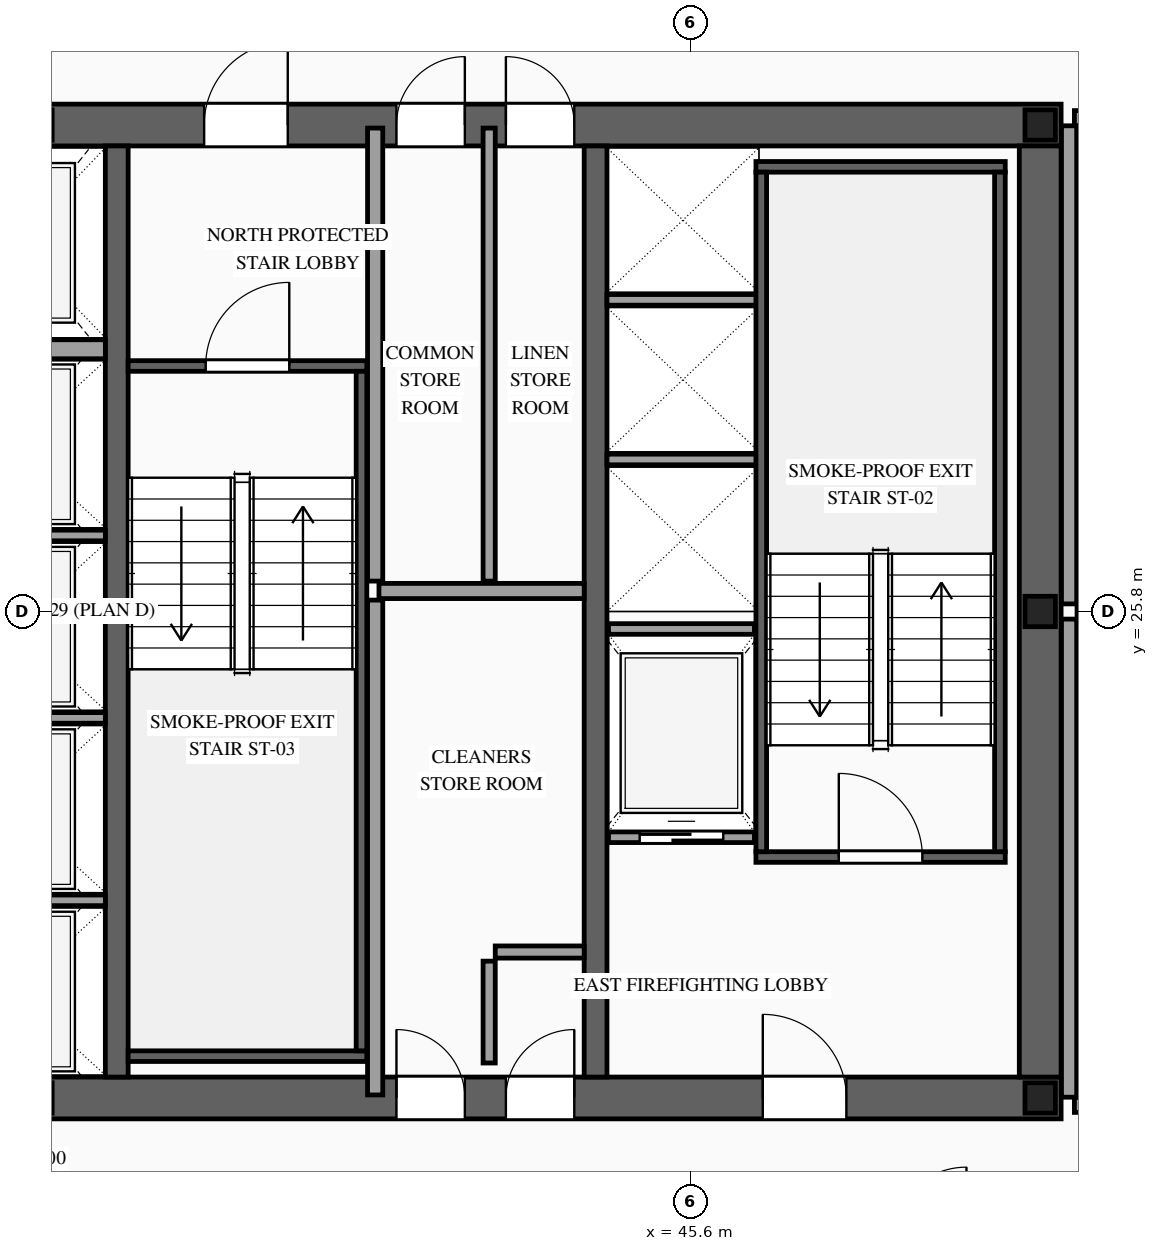
"""IFC4 building model, lengths in metres.
Left out: names, types, materials, properties, quantities, classifications, styles, units other than length and angle.
Written with IfcOpenShell. Run it as: python <this file> out.ifc"""

import sys

from ifc_helpers import new_model, si_unit, direction, frame, frame_2d, origin, origin_2d, place, context, subcontext, project, spatial, rectangle, i_section, extrude, source, transform, mapped, element, fill, save


model = new_model("IFC4")
c1 = context("Model", 3, precision=1e-05, world=origin(), true_north=direction((0.0, 1.0)))
c2 = subcontext(c1, "Body", "Model", "MODEL_VIEW")
j1 = project(units=[si_unit("LENGTHUNIT", "METRE"), si_unit("PLANEANGLEUNIT", "RADIAN")], contexts=[c1])
p1 = place(None, origin())
s1 = spatial("IfcSite", under=j1, at=p1, CompositionType="ELEMENT")
p2 = place(p1, origin())
s2 = spatial("IfcBuilding", under=s1, at=p2, CompositionType="ELEMENT")
p3 = place(p2, frame((0.0, 0.0, 238.1)))
s3 = spatial("IfcBuildingStorey", under=s2, at=p3, CompositionType="ELEMENT", Elevation=238.1)
p4 = place(p3, frame((23.525, 19.4, 0.0), z_axis=(0.0, 0.0, 1.0), x_axis=(1.0, 0.0, 0.0)))
e1 = element("IfcWall", 1, at=p4, inside=s3, PredefinedType="SHEAR", context=c2, shape_type="SweptSolid", body=[
    extrude(rectangle(XDim=26.95, YDim=0.55, at=frame_2d((13.475, 0.0))), origin(), (0.0, 0.0, 1.0), 3.5),
])
p5 = place(p4, frame((1.925, 0.0, 0.0)))
e2 = element("IfcOpeningElement", 2, at=p5, cuts=e1, PredefinedType="OPENING", context=c2, shape_type="SweptSolid", body=[
    extrude(rectangle(XDim=1.1, YDim=2.2, at=frame_2d((0.55, 1.1))), frame((0.0, 0.29, 0.0), z_axis=(0.0, -1.0, 0.0), x_axis=(1.0, 0.0, 0.0)), (0.0, 0.0, 1.0), 0.58),
])
p6 = place(p4, frame((9.825, 0.0, 0.0)))
e3 = element("IfcOpeningElement", 3, at=p6, cuts=e1, PredefinedType="OPENING", context=c2, shape_type="SweptSolid", body=[
    extrude(rectangle(XDim=1.1, YDim=2.2, at=frame_2d((0.55, 1.1))), frame((0.0, 0.29, 0.0), z_axis=(0.0, -1.0, 0.0), x_axis=(1.0, 0.0, 0.0)), (0.0, 0.0, 1.0), 0.58),
])
p7 = place(p4, frame((23.025, 0.0, 0.0)))
e4 = element("IfcOpeningElement", 4, at=p7, cuts=e1, PredefinedType="OPENING", context=c2, shape_type="SweptSolid", body=[
    extrude(rectangle(XDim=1.1, YDim=2.2, at=frame_2d((0.55, 1.1))), frame((0.0, 0.29, 0.0), z_axis=(0.0, -1.0, 0.0), x_axis=(1.0, 0.0, 0.0)), (0.0, 0.0, 1.0), 0.58),
])
p8 = place(p4, frame((19.645, 0.0, 0.0)))
e5 = element("IfcOpeningElement", 5, at=p8, cuts=e1, PredefinedType="OPENING", context=c2, shape_type="SweptSolid", body=[
    extrude(rectangle(XDim=0.9, YDim=2.15, at=frame_2d((0.45, 1.075))), frame((0.0, 0.29, 0.0), z_axis=(0.0, -1.0, 0.0), x_axis=(1.0, 0.0, 0.0)), (0.0, 0.0, 1.0), 0.58),
])
p9 = place(p4, frame((18.205, 0.0, 0.0)))
e6 = element("IfcOpeningElement", 6, at=p9, cuts=e1, PredefinedType="OPENING", context=c2, shape_type="SweptSolid", body=[
    extrude(rectangle(XDim=0.9, YDim=2.15, at=frame_2d((0.45, 1.075))), frame((0.0, 0.29, 0.0), z_axis=(0.0, -1.0, 0.0), x_axis=(1.0, 0.0, 0.0)), (0.0, 0.0, 1.0), 0.58),
])
p10 = place(p3, frame((23.525, 32.2, 0.0), z_axis=(0.0, 0.0, 1.0), x_axis=(1.0, 0.0, 0.0)))
e7 = element("IfcWall", 7, at=p10, inside=s3, PredefinedType="SHEAR", context=c2, shape_type="SweptSolid", body=[
    extrude(rectangle(XDim=26.95, YDim=0.55, at=frame_2d((13.475, 0.0))), origin(), (0.0, 0.0, 1.0), 3.5),
])
p11 = place(p10, frame((4.545, 0.0, 0.0)))
e8 = element("IfcOpeningElement", 8, at=p11, cuts=e7, PredefinedType="OPENING", context=c2, shape_type="SweptSolid", body=[
    extrude(rectangle(XDim=0.9, YDim=2.15, at=frame_2d((0.45, 1.075))), frame((0.0, 0.29, 0.0), z_axis=(0.0, -1.0, 0.0), x_axis=(1.0, 0.0, 0.0)), (0.0, 0.0, 1.0), 0.58),
])
p12 = place(p10, frame((9.825, 0.0, 0.0)))
e9 = element("IfcOpeningElement", 9, at=p12, cuts=e7, PredefinedType="OPENING", context=c2, shape_type="SweptSolid", body=[
    extrude(rectangle(XDim=1.1, YDim=2.2, at=frame_2d((0.55, 1.1))), frame((0.0, 0.29, 0.0), z_axis=(0.0, -1.0, 0.0), x_axis=(1.0, 0.0, 0.0)), (0.0, 0.0, 1.0), 0.58),
])
p13 = place(p10, frame((15.675, 0.0, 0.0)))
e10 = element("IfcOpeningElement", 10, at=p13, cuts=e7, PredefinedType="OPENING", context=c2, shape_type="SweptSolid", body=[
    extrude(rectangle(XDim=1.1, YDim=2.2, at=frame_2d((0.55, 1.1))), frame((0.0, 0.29, 0.0), z_axis=(0.0, -1.0, 0.0), x_axis=(1.0, 0.0, 0.0)), (0.0, 0.0, 1.0), 0.58),
])
p14 = place(p10, frame((18.205, 0.0, 0.0)))
e11 = element("IfcOpeningElement", 11, at=p14, cuts=e7, PredefinedType="OPENING", context=c2, shape_type="SweptSolid", body=[
    extrude(rectangle(XDim=0.9, YDim=2.15, at=frame_2d((0.45, 1.075))), frame((0.0, 0.29, 0.0), z_axis=(0.0, -1.0, 0.0), x_axis=(1.0, 0.0, 0.0)), (0.0, 0.0, 1.0), 0.58),
])
p15 = place(p10, frame((19.645, 0.0, 0.0)))
e12 = element("IfcOpeningElement", 12, at=p15, cuts=e7, PredefinedType="OPENING", context=c2, shape_type="SweptSolid", body=[
    extrude(rectangle(XDim=0.9, YDim=2.15, at=frame_2d((0.45, 1.075))), frame((0.0, 0.29, 0.0), z_axis=(0.0, -1.0, 0.0), x_axis=(1.0, 0.0, 0.0)), (0.0, 0.0, 1.0), 0.58),
])
m1 = source(origin(), c2, "Body", "SweptSolid", [
    extrude(rectangle(XDim=12.25, YDim=0.55, at=frame_2d((6.125, 0.0))), origin(), (0.0, 0.0, 1.0), 3.5),
])
p16 = place(p3, frame((50.2, 19.675, 0.0), z_axis=(0.0, 0.0, 1.0), x_axis=(0.0, 1.0, 0.0)))
e13 = element("IfcWall", 13, at=p16, inside=s3, PredefinedType="SHEAR", context=c2, shape_type="MappedRepresentation", body=[
    mapped(m1, transform((0.0, 0.0, 0.0), scale=1.0)),
])
m2 = source(origin(), c2, "Body", "SweptSolid", [
    extrude(rectangle(XDim=12.25, YDim=0.3, at=frame_2d((6.125, 0.0))), origin(), (0.0, 0.0, 1.0), 3.5),
])
for number, where, z_axis, x_axis in (
    (14, (38.05, 19.675, 0.0), (0.0, 0.0, 1.0), (0.0, 1.0, 0.0)),
    (15, (44.35, 19.675, 0.0), (0.0, 0.0, 1.0), (0.0, 1.0, 0.0)),
):
    element("IfcWall", number, at=place(p3, frame(where, z_axis=z_axis, x_axis=x_axis)), inside=s3, PredefinedType="SOLIDWALL", context=c2, shape_type="MappedRepresentation", body=[
        mapped(m2, transform((0.0, 0.0, 0.0), scale=1.0)),
    ])
m3 = source(origin(), c2, "Body", "SweptSolid", [
    extrude(i_section(OverallWidth=0.4, OverallDepth=0.4, WebThickness=0.013, FlangeThickness=0.021, at=origin_2d()), origin(), (0.0, 0.0, 1.0), 3.5),
])
for number, where, z_axis, x_axis in (
    (16, (50.2, 19.4, 0.0), (0.0, 0.0, 1.0), (1.0, 0.0, 0.0)),
    (17, (50.2, 25.8, 0.0), (0.0, 0.0, 1.0), (1.0, 0.0, 0.0)),
    (18, (50.2, 32.2, 0.0), (0.0, 0.0, 1.0), (1.0, 0.0, 0.0)),
):
    element("IfcColumn", number, at=place(p3, frame(where, z_axis=z_axis, x_axis=x_axis)), inside=s3, PredefinedType="COLUMN", context=c2, shape_type="MappedRepresentation", body=[
        mapped(m3, transform((0.0, 0.0, 0.0), scale=1.0)),
    ])
p17 = place(p3, frame((44.52, 22.83, 0.0), z_axis=(0.0, 0.0, 1.0), x_axis=(1.0, 0.0, 0.0)))
e19 = element("IfcWall", 19, at=p17, inside=s3, PredefinedType="SOLIDWALL", context=c2, shape_type="SweptSolid", body=[
    extrude(rectangle(XDim=1.92, YDim=0.14, at=frame_2d((0.96, 0.0))), origin(), (0.0, 0.0, 1.0), 3.28),
])
p18 = place(p17, frame((0.41, 0.0, 0.0)))
e20 = element("IfcOpeningElement", 20, at=p18, cuts=e19, PredefinedType="OPENING", context=c2, shape_type="SweptSolid", body=[
    extrude(rectangle(XDim=1.1, YDim=2.2, at=frame_2d((0.55, 1.1))), frame((0.0, 0.085, 0.0), z_axis=(0.0, -1.0, 0.0), x_axis=(1.0, 0.0, 0.0)), (0.0, 0.0, 1.0), 0.17),
])
m4 = source(origin(), c2, "Body", "SweptSolid", [
    extrude(rectangle(XDim=1.92, YDim=0.14, at=frame_2d((0.96, 0.0))), origin(), (0.0, 0.0, 1.0), 3.28),
])
p19 = place(p3, frame((44.52, 25.57, 0.0), z_axis=(0.0, 0.0, 1.0), x_axis=(1.0, 0.0, 0.0)))
e21 = element("IfcWall", 21, at=p19, inside=s3, PredefinedType="SOLIDWALL", context=c2, shape_type="MappedRepresentation", body=[
    mapped(m4, transform((0.0, 0.0, 0.0), scale=1.0)),
])
m5 = source(origin(), c2, "Body", "SweptSolid", [
    extrude(rectangle(XDim=2.4, YDim=0.14, at=frame_2d((1.2, 0.0))), origin(), (0.0, 0.0, 1.0), 3.28),
])
for number, where, z_axis, x_axis in (
    (22, (35.5, 22.0, 0.0), (0.0, 0.0, 1.0), (1.0, 0.0, 0.0)),
    (23, (35.5, 24.4, 0.0), (0.0, 0.0, 1.0), (1.0, 0.0, 0.0)),
    (24, (35.5, 26.8, 0.0), (0.0, 0.0, 1.0), (1.0, 0.0, 0.0)),
):
    element("IfcWall", number, at=place(p3, frame(where, z_axis=z_axis, x_axis=x_axis)), inside=s3, PredefinedType="SOLIDWALL", context=c2, shape_type="MappedRepresentation", body=[
        mapped(m5, transform((0.0, 0.0, 0.0), scale=1.0)),
    ])
m6 = source(origin(), c2, "Body", "SweptSolid", [
    extrude(rectangle(XDim=2.4, YDim=0.25, at=frame_2d((1.2, 0.0))), origin(), (0.0, 0.0, 1.0), 3.28),
])
p20 = place(p3, frame((35.5, 29.25, 0.0), z_axis=(0.0, 0.0, 1.0), x_axis=(1.0, 0.0, 0.0)))
e25 = element("IfcWall", 25, at=p20, inside=s3, PredefinedType="SOLIDWALL", context=c2, shape_type="MappedRepresentation", body=[
    mapped(m6, transform((0.0, 0.0, 0.0), scale=1.0)),
])
m7 = source(origin(), c2, "Body", "SweptSolid", [
    extrude(rectangle(XDim=2.0, YDim=0.14, at=frame_2d((1.0, 0.0))), origin(), (0.0, 0.0, 1.0), 3.28),
])
for number, where, z_axis, x_axis in (
    (26, (44.5, 27.8, 0.0), (0.0, 0.0, 1.0), (1.0, 0.0, 0.0)),
    (27, (44.5, 29.9, 0.0), (0.0, 0.0, 1.0), (1.0, 0.0, 0.0)),
):
    element("IfcWall", number, at=place(p3, frame(where, z_axis=z_axis, x_axis=x_axis)), inside=s3, PredefinedType="SOLIDWALL", context=c2, shape_type="MappedRepresentation", body=[
        mapped(m7, transform((0.0, 0.0, 0.0), scale=1.0)),
    ])
p21 = place(p3, frame((46.46, 22.57, 0.0), z_axis=(0.0, 0.0, 1.0), x_axis=(1.0, 0.0, 0.0)))
e28 = element("IfcWall", 28, at=p21, inside=s3, PredefinedType="SOLIDWALL", context=c2, shape_type="SweptSolid", body=[
    extrude(rectangle(XDim=3.28, YDim=0.14, at=frame_2d((1.64, 0.0))), origin(), (0.0, 0.0, 1.0), 3.28),
])
p22 = place(p21, frame((1.09, 0.0, 0.0)))
e29 = element("IfcOpeningElement", 29, at=p22, cuts=e28, PredefinedType="OPENING", context=c2, shape_type="SweptSolid", body=[
    extrude(rectangle(XDim=1.1, YDim=2.2, at=frame_2d((0.55, 1.1))), frame((0.0, 0.085, 0.0), z_axis=(0.0, -1.0, 0.0), x_axis=(1.0, 0.0, 0.0)), (0.0, 0.0, 1.0), 0.17),
])
m8 = source(origin(), c2, "Body", "SweptSolid", [
    extrude(rectangle(XDim=3.28, YDim=0.14, at=frame_2d((1.64, 0.0))), origin(), (0.0, 0.0, 1.0), 3.28),
])
p23 = place(p3, frame((46.46, 31.65, 0.0), z_axis=(0.0, 0.0, 1.0), x_axis=(1.0, 0.0, 0.0)))
e30 = element("IfcWall", 30, at=p23, inside=s3, PredefinedType="SOLIDWALL", context=c2, shape_type="MappedRepresentation", body=[
    mapped(m8, transform((0.0, 0.0, 0.0), scale=1.0)),
])
m9 = source(origin(), c2, "Body", "SweptSolid", [
    extrude(rectangle(XDim=8.94, YDim=0.14, at=frame_2d((4.47, 0.0))), origin(), (0.0, 0.0, 1.0), 3.28),
])
for number, where, z_axis, x_axis in (
    (31, (46.53, 22.64, 0.0), (0.0, 0.0, 1.0), (0.0, 1.0, 0.0)),
    (32, (49.67, 22.64, 0.0), (0.0, 0.0, 1.0), (0.0, 1.0, 0.0)),
):
    element("IfcWall", number, at=place(p3, frame(where, z_axis=z_axis, x_axis=x_axis)), inside=s3, PredefinedType="SOLIDWALL", context=c2, shape_type="MappedRepresentation", body=[
        mapped(m9, transform((0.0, 0.0, 0.0), scale=1.0)),
    ])
p24 = place(p3, frame((38.2, 29.03, 0.0), z_axis=(0.0, 0.0, 1.0), x_axis=(1.0, 0.0, 0.0)))
e33 = element("IfcWall", 33, at=p24, inside=s3, PredefinedType="SOLIDWALL", context=c2, shape_type="SweptSolid", body=[
    extrude(rectangle(XDim=3.14, YDim=0.14, at=frame_2d((1.57, 0.0))), origin(), (0.0, 0.0, 1.0), 3.28),
])
p25 = place(p24, frame((1.02, 0.0, 0.0)))
e34 = element("IfcOpeningElement", 34, at=p25, cuts=e33, PredefinedType="OPENING", context=c2, shape_type="SweptSolid", body=[
    extrude(rectangle(XDim=1.1, YDim=2.2, at=frame_2d((0.55, 1.1))), frame((0.0, 0.085, 0.0), z_axis=(0.0, -1.0, 0.0), x_axis=(1.0, 0.0, 0.0)), (0.0, 0.0, 1.0), 0.17),
])
m10 = source(origin(), c2, "Body", "SweptSolid", [
    extrude(rectangle(XDim=3.14, YDim=0.14, at=frame_2d((1.57, 0.0))), origin(), (0.0, 0.0, 1.0), 3.28),
])
p26 = place(p3, frame((38.2, 19.95, 0.0), z_axis=(0.0, 0.0, 1.0), x_axis=(1.0, 0.0, 0.0)))
e35 = element("IfcWall", 35, at=p26, inside=s3, PredefinedType="SOLIDWALL", context=c2, shape_type="MappedRepresentation", body=[
    mapped(m10, transform((0.0, 0.0, 0.0), scale=1.0)),
])
m11 = source(origin(), c2, "Body", "SweptSolid", [
    extrude(rectangle(XDim=8.94, YDim=0.14, at=frame_2d((4.47, 0.0))), origin(), (0.0, 0.0, 1.0), 3.28),
])
p27 = place(p3, frame((41.27, 20.02, 0.0), z_axis=(0.0, 0.0, 1.0), x_axis=(0.0, 1.0, 0.0)))
e36 = element("IfcWall", 36, at=p27, inside=s3, PredefinedType="SOLIDWALL", context=c2, shape_type="MappedRepresentation", body=[
    mapped(m11, transform((0.0, 0.0, 0.0), scale=1.0)),
])
m12 = source(origin(), c2, "Body", "SweptSolid", [
    extrude(rectangle(XDim=1.34, YDim=0.16, at=frame_2d((0.67, 0.0))), origin(), (0.0, 0.0, 1.0), 3.28),
])
p28 = place(p3, frame((42.95, 19.86, 0.0), z_axis=(0.0, 0.0, 1.0), x_axis=(0.0, 1.0, 0.0)))
e37 = element("IfcWall", 37, at=p28, inside=s3, PredefinedType="PARTITIONING", context=c2, shape_type="MappedRepresentation", body=[
    mapped(m12, transform((0.0, 0.0, 0.0), scale=1.0)),
])
m13 = source(origin(), c2, "Body", "SweptSolid", [
    extrude(rectangle(XDim=1.17, YDim=0.16, at=frame_2d((0.585, 0.0))), origin(), (0.0, 0.0, 1.0), 3.28),
])
p29 = place(p3, frame((43.03, 21.32, 0.0), z_axis=(0.0, 0.0, 1.0), x_axis=(1.0, 0.0, 0.0)))
e38 = element("IfcWall", 38, at=p29, inside=s3, PredefinedType="PARTITIONING", context=c2, shape_type="MappedRepresentation", body=[
    mapped(m13, transform((0.0, 0.0, 0.0), scale=1.0)),
])
m14 = source(origin(), c2, "Body", "SweptSolid", [
    extrude(rectangle(XDim=6.51, YDim=0.2, at=frame_2d((3.255, 0.0))), origin(), (0.0, 0.0, 1.0), 3.28),
])
p30 = place(p3, frame((41.45, 19.44, 0.0), z_axis=(0.0, 0.0, 1.0), x_axis=(0.0, 1.0, 0.0)))
e39 = element("IfcWall", 39, at=p30, inside=s3, PredefinedType="PARTITIONING", context=c2, shape_type="MappedRepresentation", body=[
    mapped(m14, transform((0.0, 0.0, 0.0), scale=1.0)),
])
m15 = source(origin(), c2, "Body", "SweptSolid", [
    extrude(rectangle(XDim=2.7, YDim=0.2, at=frame_2d((1.35, 0.0))), origin(), (0.0, 0.0, 1.0), 3.28),
])
p31 = place(p3, frame((41.5, 26.07, 0.0), z_axis=(0.0, 0.0, 1.0), x_axis=(1.0, 0.0, 0.0)))
e40 = element("IfcWall", 40, at=p31, inside=s3, PredefinedType="PARTITIONING", context=c2, shape_type="MappedRepresentation", body=[
    mapped(m15, transform((0.0, 0.0, 0.0), scale=1.0)),
])
m16 = source(origin(), c2, "Body", "SweptSolid", [
    extrude(rectangle(XDim=5.96, YDim=0.2, at=frame_2d((2.98, 0.0))), origin(), (0.0, 0.0, 1.0), 3.28),
])
p32 = place(p3, frame((41.45, 26.2, 0.0), z_axis=(0.0, 0.0, 1.0), x_axis=(0.0, 1.0, 0.0)))
e41 = element("IfcWall", 41, at=p32, inside=s3, PredefinedType="PARTITIONING", context=c2, shape_type="MappedRepresentation", body=[
    mapped(m16, transform((0.0, 0.0, 0.0), scale=1.0)),
])
m17 = source(origin(), c2, "Body", "SweptSolid", [
    extrude(rectangle(XDim=5.96, YDim=0.16, at=frame_2d((2.98, 0.0))), origin(), (0.0, 0.0, 1.0), 3.28),
])
p33 = place(p3, frame((42.95, 26.2, 0.0), z_axis=(0.0, 0.0, 1.0), x_axis=(0.0, 1.0, 0.0)))
e42 = element("IfcWall", 42, at=p33, inside=s3, PredefinedType="PARTITIONING", context=c2, shape_type="MappedRepresentation", body=[
    mapped(m17, transform((0.0, 0.0, 0.0), scale=1.0)),
])
p34 = place(p3, frame((50.65, 19.31, 0.0), z_axis=(0.0, 0.0, 1.0), x_axis=(1.0, 0.0, 0.0)))
e43 = element("IfcWall", 43, at=p34, inside=s3, PredefinedType="PARTITIONING", context=c2, shape_type="SweptSolid", body=[
    extrude(rectangle(XDim=6.8, YDim=0.2, at=frame_2d((3.4, 0.0))), origin(), (0.0, 0.0, 1.0), 2.825),
])
p35 = place(p34, frame((2.8, 0.0, 0.0)))
e44 = element("IfcOpeningElement", 44, at=p35, cuts=e43, PredefinedType="OPENING", context=c2, shape_type="SweptSolid", body=[
    extrude(rectangle(XDim=1.0, YDim=2.2, at=frame_2d((0.5, 1.1))), frame((0.0, 0.115, 0.0), z_axis=(0.0, -1.0, 0.0), x_axis=(1.0, 0.0, 0.0)), (0.0, 0.0, 1.0), 0.23),
])
m18 = source(origin(), c2, "Body", "SweptSolid", [
    extrude(rectangle(XDim=6.765, YDim=0.2, at=frame_2d((3.382, 0.0))), origin(), (0.0, 0.0, 1.0), 2.787),
])
p36 = place(p3, frame((50.685, 25.8, 0.0), z_axis=(0.0, 0.0, 1.0), x_axis=(1.0, 0.0, 0.0)))
e45 = element("IfcWall", 45, at=p36, inside=s3, PredefinedType="PARTITIONING", context=c2, shape_type="MappedRepresentation", body=[
    mapped(m18, transform((0.0, 0.0, 0.0), scale=1.0)),
])
m19 = source(origin(), c2, "Body", "SweptSolid", [
    extrude(rectangle(XDim=6.29, YDim=0.2, at=frame_2d((3.145, 0.0))), origin(), (0.0, 0.0, 1.0), 3.28),
])
p37 = place(p3, frame((50.58, 19.41, 0.0), z_axis=(0.0, 0.0, 1.0), x_axis=(0.0, 1.0, 0.0)))
e46 = element("IfcWall", 46, at=p37, inside=s3, PredefinedType="PARTITIONING", context=c2, shape_type="MappedRepresentation", body=[
    mapped(m19, transform((0.0, 0.0, 0.0), scale=1.0)),
])
p38 = place(p3, frame((50.65, 32.29, 0.0), z_axis=(0.0, 0.0, 1.0), x_axis=(1.0, 0.0, 0.0)))
e47 = element("IfcWall", 47, at=p38, inside=s3, PredefinedType="PARTITIONING", context=c2, shape_type="SweptSolid", body=[
    extrude(rectangle(XDim=6.8, YDim=0.2, at=frame_2d((3.4, 0.0))), origin(), (0.0, 0.0, 1.0), 2.825),
])
p39 = place(p38, frame((2.835, 0.0, 0.0)))
e48 = element("IfcOpeningElement", 48, at=p39, cuts=e47, PredefinedType="OPENING", context=c2, shape_type="SweptSolid", body=[
    extrude(rectangle(XDim=1.0, YDim=2.2, at=frame_2d((0.5, 1.1))), frame((0.0, 0.115, 0.0), z_axis=(0.0, -1.0, 0.0), x_axis=(1.0, 0.0, 0.0)), (0.0, 0.0, 1.0), 0.23),
])
p40 = place(p3, frame((50.58, 25.9, 0.0), z_axis=(0.0, 0.0, 1.0), x_axis=(0.0, 1.0, 0.0)))
e49 = element("IfcWall", 49, at=p40, inside=s3, PredefinedType="PARTITIONING", context=c2, shape_type="MappedRepresentation", body=[
    mapped(m19, transform((0.0, 0.0, 0.0), scale=1.0)),
])
m20 = source(origin(), c2, "Body", "SweptSolid", [
    extrude(rectangle(XDim=1.1, YDim=2.2, at=frame_2d((0.55, 1.1))), frame((0.0, 0.025, 0.0), z_axis=(0.0, -1.0, 0.0), x_axis=(1.0, 0.0, 0.0)), (0.0, 0.0, 1.0), 0.05),
])
p41 = place(p18, origin())
e50 = element("IfcDoor", 50, at=p41, inside=s3, OperationType="SLIDING_TO_RIGHT", PredefinedType="DOOR", context=c2, shape_type="MappedRepresentation", body=[
    mapped(m20, transform((0.0, 0.0, 0.0), scale=1.0)),
])
fill(e20, e50)
m21 = source(origin(), c2, "Body", "SweptSolid", [
    extrude(rectangle(XDim=1.1, YDim=2.2, at=frame_2d((0.55, 1.1))), frame((0.0, 0.025, 0.0), z_axis=(0.0, -1.0, 0.0), x_axis=(1.0, 0.0, 0.0)), (0.0, 0.0, 1.0), 0.05),
])
p42 = place(p22, origin())
e51 = element("IfcDoor", 51, at=p42, inside=s3, OperationType="SINGLE_SWING_LEFT", PredefinedType="DOOR", context=c2, shape_type="MappedRepresentation", body=[
    mapped(m21, transform((0.0, 0.0, 0.0), scale=1.0)),
])
fill(e29, e51)
p43 = place(p25, origin())
e52 = element("IfcDoor", 52, at=p43, inside=s3, OperationType="SINGLE_SWING_RIGHT", PredefinedType="DOOR", context=c2, shape_type="MappedRepresentation", body=[
    mapped(m21, transform((0.0, 0.0, 0.0), scale=1.0)),
])
fill(e34, e52)
p44 = place(p7, origin())
e53 = element("IfcDoor", 53, at=p44, inside=s3, OperationType="SINGLE_SWING_LEFT", PredefinedType="DOOR", context=c2, shape_type="MappedRepresentation", body=[
    mapped(m21, transform((0.0, 0.0, 0.0), scale=1.0)),
])
fill(e4, e53)
p45 = place(p13, origin())
e54 = element("IfcDoor", 54, at=p45, inside=s3, OperationType="SINGLE_SWING_RIGHT", PredefinedType="DOOR", context=c2, shape_type="MappedRepresentation", body=[
    mapped(m21, transform((0.0, 0.0, 0.0), scale=1.0)),
])
fill(e10, e54)
m22 = source(origin(), c2, "Body", "SweptSolid", [
    extrude(rectangle(XDim=0.9, YDim=2.15, at=frame_2d((0.45, 1.075))), frame((0.0, 0.025, 0.0), z_axis=(0.0, -1.0, 0.0), x_axis=(1.0, 0.0, 0.0)), (0.0, 0.0, 1.0), 0.05),
])
p46 = place(p8, origin())
e55 = element("IfcDoor", 55, at=p46, inside=s3, OperationType="SINGLE_SWING_RIGHT", PredefinedType="DOOR", context=c2, shape_type="MappedRepresentation", body=[
    mapped(m22, transform((0.0, 0.0, 0.0), scale=1.0)),
])
fill(e5, e55)
p47 = place(p9, origin())
e56 = element("IfcDoor", 56, at=p47, inside=s3, OperationType="SINGLE_SWING_LEFT", PredefinedType="DOOR", context=c2, shape_type="MappedRepresentation", body=[
    mapped(m22, transform((0.0, 0.0, 0.0), scale=1.0)),
])
fill(e6, e56)
p48 = place(p14, origin())
e57 = element("IfcDoor", 57, at=p48, inside=s3, OperationType="SINGLE_SWING_RIGHT", PredefinedType="DOOR", context=c2, shape_type="MappedRepresentation", body=[
    mapped(m22, transform((0.0, 0.0, 0.0), scale=1.0)),
])
fill(e11, e57)
p49 = place(p15, origin())
e58 = element("IfcDoor", 58, at=p49, inside=s3, OperationType="SINGLE_SWING_LEFT", PredefinedType="DOOR", context=c2, shape_type="MappedRepresentation", body=[
    mapped(m22, transform((0.0, 0.0, 0.0), scale=1.0)),
])
fill(e12, e58)
save(model, sys.argv[1])
